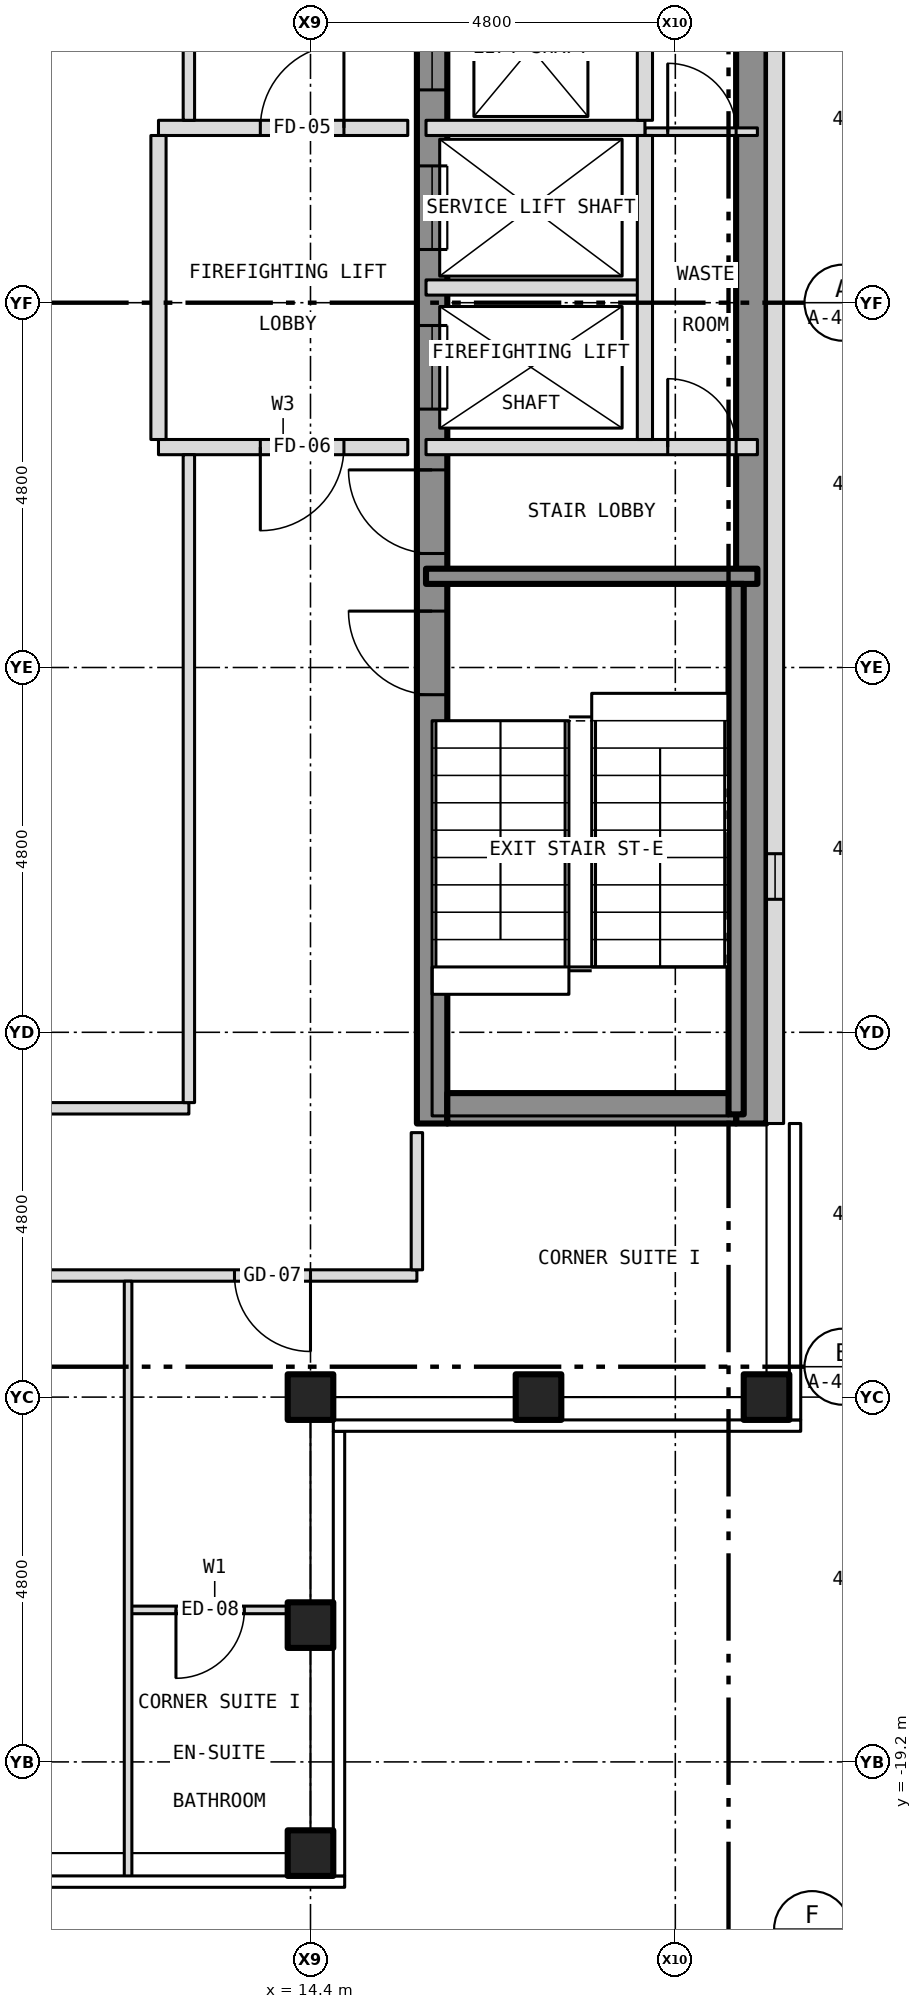
"""IFC4 building model, lengths in metres.
Left out: names, types, materials, properties, quantities, classifications, styles, units other than length and angle.
Written with IfcOpenShell. Run it as: python <this file> out.ifc"""

import sys

from ifc_helpers import new_model, si_unit, direction, frame, frame_2d, origin, origin_2d, place, context, subcontext, project, spatial, rectangle, hollow_rectangle, extrude, element, fill, save


model = new_model("IFC4")
c1 = context("Model", 3, precision=1e-05, world=origin(), true_north=direction((0.0, 1.0)))
c2 = subcontext(c1, "Body", "Model", "MODEL_VIEW")
j1 = project(units=[si_unit("LENGTHUNIT", "METRE"), si_unit("PLANEANGLEUNIT", "RADIAN")], contexts=[c1])
p1 = place(None, origin())
s1 = spatial("IfcSite", under=j1, at=p1, CompositionType="ELEMENT")
p2 = place(p1, origin())
s2 = spatial("IfcBuilding", under=s1, at=p2, CompositionType="ELEMENT")
p3 = place(p2, frame((0.0, 0.0, 255.0)))
s3 = spatial("IfcBuildingStorey", under=s2, at=p3, CompositionType="ELEMENT", Elevation=255.0)
for number, where, z_axis, x_axis in (
    (1, (14.4, -20.4, -0.15), (0.0, 0.0, 1.0), (1.0, 0.0, 0.0)),
    (2, (20.4, -14.4, -0.15), (0.0, 0.0, 1.0), (1.0, 0.0, 0.0)),
    (3, (14.4, -14.4, -0.15), (0.0, 0.0, 1.0), (1.0, 0.0, 0.0)),
    (4, (14.4, -17.4, -0.15), (0.0, 0.0, 1.0), (1.0, 0.0, 0.0)),
    (5, (17.4, -14.4, -0.15), (0.0, 0.0, 1.0), (1.0, 0.0, 0.0)),
):
    element("IfcColumn", number, at=place(p3, frame(where, z_axis=z_axis, x_axis=x_axis)), inside=s3, PredefinedType="COLUMN", context=c2, shape_type="SweptSolid", body=[
        extrude(hollow_rectangle(XDim=0.6, YDim=0.6, WallThickness=0.03, at=origin_2d()), origin(), (0.0, 0.0, 1.0), 3.5),
    ])
p4 = place(p3, frame((16.0, -10.8, 0.0), z_axis=(0.0, 0.0, 1.0), x_axis=(0.0, 1.0, 0.0)))
e6 = element("IfcWall", 6, at=p4, inside=s3, PredefinedType="SHEAR", context=c2, shape_type="SweptSolid", body=[
    extrude(rectangle(XDim=21.6, YDim=0.4, at=frame_2d((10.8, 0.0))), origin(), (0.0, 0.0, 1.0), 3.25),
])
p5 = place(p4, frame((9.4, 0.0, 0.0)))
e7 = element("IfcOpeningElement", 7, at=p5, cuts=e6, PredefinedType="OPENING", context=c2, shape_type="SweptSolid", body=[
    extrude(rectangle(XDim=1.1, YDim=2.1, at=frame_2d((0.55, 1.05))), frame((0.0, 0.212, 0.0), z_axis=(0.0, -1.0, 0.0), x_axis=(1.0, 0.0, 0.0)), (0.0, 0.0, 1.0), 0.424),
])
p6 = place(p4, frame((11.5, 0.0, 0.0)))
e8 = element("IfcOpeningElement", 8, at=p6, cuts=e6, PredefinedType="OPENING", context=c2, shape_type="SweptSolid", body=[
    extrude(rectangle(XDim=1.1, YDim=2.1, at=frame_2d((0.55, 1.05))), frame((0.0, 0.212, 0.0), z_axis=(0.0, -1.0, 0.0), x_axis=(1.0, 0.0, 0.0)), (0.0, 0.0, 1.0), 0.424),
])
p7 = place(p4, frame((13.6, 0.0, 0.0)))
e9 = element("IfcOpeningElement", 9, at=p7, cuts=e6, PredefinedType="OPENING", context=c2, shape_type="SweptSolid", body=[
    extrude(rectangle(XDim=1.1, YDim=2.1, at=frame_2d((0.55, 1.05))), frame((0.0, 0.212, 0.0), z_axis=(0.0, -1.0, 0.0), x_axis=(1.0, 0.0, 0.0)), (0.0, 0.0, 1.0), 0.424),
])
p8 = place(p4, frame((15.7, 0.0, 0.0)))
e10 = element("IfcOpeningElement", 10, at=p8, cuts=e6, PredefinedType="OPENING", context=c2, shape_type="SweptSolid", body=[
    extrude(rectangle(XDim=1.1, YDim=2.1, at=frame_2d((0.55, 1.05))), frame((0.0, 0.212, 0.0), z_axis=(0.0, -1.0, 0.0), x_axis=(1.0, 0.0, 0.0)), (0.0, 0.0, 1.0), 0.424),
])
p9 = place(p4, frame((17.8, 0.0, 0.0)))
e11 = element("IfcOpeningElement", 11, at=p9, cuts=e6, PredefinedType="OPENING", context=c2, shape_type="SweptSolid", body=[
    extrude(rectangle(XDim=1.1, YDim=2.1, at=frame_2d((0.55, 1.05))), frame((0.0, 0.212, 0.0), z_axis=(0.0, -1.0, 0.0), x_axis=(1.0, 0.0, 0.0)), (0.0, 0.0, 1.0), 0.424),
])
p10 = place(p4, frame((5.642, 0.0, 0.0)))
e12 = element("IfcOpeningElement", 12, at=p10, cuts=e6, PredefinedType="OPENING", context=c2, shape_type="SweptSolid", body=[
    extrude(rectangle(XDim=1.1, YDim=2.1, at=frame_2d((0.55, 1.05))), frame((0.0, 0.212, 0.0), z_axis=(0.0, -1.0, 0.0), x_axis=(1.0, 0.0, 0.0)), (0.0, 0.0, 1.0), 0.424),
])
p11 = place(p4, frame((7.5, 0.0, 0.0)))
e13 = element("IfcOpeningElement", 13, at=p11, cuts=e6, PredefinedType="OPENING", context=c2, shape_type="SweptSolid", body=[
    extrude(rectangle(XDim=1.1, YDim=2.1, at=frame_2d((0.55, 1.05))), frame((0.0, 0.212, 0.0), z_axis=(0.0, -1.0, 0.0), x_axis=(1.0, 0.0, 0.0)), (0.0, 0.0, 1.0), 0.424),
])
p12 = place(p4, frame((20.0, 0.0, 0.0)))
e14 = element("IfcOpeningElement", 14, at=p12, cuts=e6, PredefinedType="OPENING", context=c2, shape_type="SweptSolid", body=[
    extrude(rectangle(XDim=0.9, YDim=2.1, at=frame_2d((0.45, 1.05))), frame((0.0, 0.212, 0.0), z_axis=(0.0, -1.0, 0.0), x_axis=(1.0, 0.0, 0.0)), (0.0, 0.0, 1.0), 0.424),
])
p13 = place(p3, frame((20.2, -10.8, 0.0), z_axis=(0.0, 0.0, 1.0), x_axis=(0.0, 1.0, 0.0)))
e15 = element("IfcWall", 15, at=p13, inside=s3, PredefinedType="SHEAR", context=c2, shape_type="SweptSolid", body=[
    extrude(rectangle(XDim=21.6, YDim=0.4, at=frame_2d((10.8, 0.0))), origin(), (0.0, 0.0, 1.0), 3.25),
])
p14 = place(p3, frame((16.2, -10.6, 0.0), z_axis=(0.0, 0.0, 1.0), x_axis=(1.0, 0.0, 0.0)))
e16 = element("IfcWall", 16, at=p14, inside=s3, PredefinedType="SHEAR", context=c2, shape_type="SweptSolid", body=[
    extrude(rectangle(XDim=3.8, YDim=0.4, at=frame_2d((1.9, 0.0))), origin(), (0.0, 0.0, 1.0), 3.25),
])
p15 = place(p3, frame((20.512, -10.8, 0.0), z_axis=(0.0, 0.0, 1.0), x_axis=(0.0, 1.0, 0.0)))
e17 = element("IfcWall", 17, at=p15, inside=s3, PredefinedType="SOLIDWALL", context=c2, shape_type="SweptSolid", body=[
    extrude(rectangle(XDim=21.6, YDim=0.225, at=frame_2d((10.8, 0.0))), origin(), (0.0, 0.0, 1.0), 3.5),
])
p16 = place(p15, frame((2.95, 0.0, 1.0)))
e18 = element("IfcOpeningElement", 18, at=p16, cuts=e17, PredefinedType="OPENING", context=c2, shape_type="SweptSolid", body=[
    extrude(rectangle(XDim=0.6, YDim=1.5, at=frame_2d((0.3, 0.75))), frame((0.0, 0.125, 0.0), z_axis=(0.0, -1.0, 0.0), x_axis=(1.0, 0.0, 0.0)), (0.0, 0.0, 1.0), 0.249),
])
p17 = place(p3, frame((12.0, -17.2, 0.0), z_axis=(0.0, 0.0, 1.0), x_axis=(1.0, 0.0, 0.0)))
e19 = element("IfcWall", 19, at=p17, inside=s3, PredefinedType="PARTITIONING", context=c2, shape_type="SweptSolid", body=[
    extrude(rectangle(XDim=2.28, YDim=0.1, at=frame_2d((1.14, 0.0))), origin(), (0.0, 0.0, 1.0), 3.35),
])
p18 = place(p17, frame((0.63, 0.0, 0.0)))
e20 = element("IfcOpeningElement", 20, at=p18, cuts=e19, PredefinedType="OPENING", context=c2, shape_type="SweptSolid", body=[
    extrude(rectangle(XDim=0.9, YDim=2.1, at=frame_2d((0.45, 1.05))), frame((0.0, 0.062, 0.0), z_axis=(0.0, -1.0, 0.0), x_axis=(1.0, 0.0, 0.0)), (0.0, 0.0, 1.0), 0.124),
])
p19 = place(p3, frame((-15.8, -12.8, 0.0), z_axis=(0.0, 0.0, 1.0), x_axis=(1.0, 0.0, 0.0)))
e21 = element("IfcWall", 21, at=p19, inside=s3, PredefinedType="PARTITIONING", context=c2, shape_type="SweptSolid", body=[
    extrude(rectangle(XDim=31.6, YDim=0.15, at=frame_2d((15.8, 0.0))), origin(), (0.0, 0.0, 1.0), 3.35),
])
p20 = place(p19, frame((10.55, 0.0, 0.0)))
e22 = element("IfcOpeningElement", 22, at=p20, cuts=e21, PredefinedType="OPENING", context=c2, shape_type="SweptSolid", body=[
    extrude(rectangle(XDim=0.9, YDim=2.1, at=frame_2d((0.45, 1.05))), frame((0.0, 0.087, 0.0), z_axis=(0.0, -1.0, 0.0), x_axis=(1.0, 0.0, 0.0)), (0.0, 0.0, 1.0), 0.174),
])
p21 = place(p19, frame((19.0, 0.0, 0.0)))
e23 = element("IfcOpeningElement", 23, at=p21, cuts=e21, PredefinedType="OPENING", context=c2, shape_type="SweptSolid", body=[
    extrude(rectangle(XDim=1.0, YDim=2.1, at=frame_2d((0.5, 1.05))), frame((0.0, 0.087, 0.0), z_axis=(0.0, -1.0, 0.0), x_axis=(1.0, 0.0, 0.0)), (0.0, 0.0, 1.0), 0.174),
])
p22 = place(p19, frame((24.95, 0.0, 0.0)))
e24 = element("IfcOpeningElement", 24, at=p22, cuts=e21, PredefinedType="OPENING", context=c2, shape_type="SweptSolid", body=[
    extrude(rectangle(XDim=0.9, YDim=2.1, at=frame_2d((0.45, 1.05))), frame((0.0, 0.087, 0.0), z_axis=(0.0, -1.0, 0.0), x_axis=(1.0, 0.0, 0.0)), (0.0, 0.0, 1.0), 0.174),
])
p23 = place(p19, frame((1.4, 0.0, 0.0)))
e25 = element("IfcOpeningElement", 25, at=p23, cuts=e21, PredefinedType="OPENING", context=c2, shape_type="SweptSolid", body=[
    extrude(rectangle(XDim=1.0, YDim=2.1, at=frame_2d((0.5, 1.05))), frame((0.0, 0.087, 0.0), z_axis=(0.0, -1.0, 0.0), x_axis=(1.0, 0.0, 0.0)), (0.0, 0.0, 1.0), 0.174),
])
p24 = place(p19, frame((29.2, 0.0, 0.0)))
e26 = element("IfcOpeningElement", 26, at=p24, cuts=e21, PredefinedType="OPENING", context=c2, shape_type="SweptSolid", body=[
    extrude(rectangle(XDim=1.0, YDim=2.1, at=frame_2d((0.5, 1.05))), frame((0.0, 0.087, 0.0), z_axis=(0.0, -1.0, 0.0), x_axis=(1.0, 0.0, 0.0)), (0.0, 0.0, 1.0), 0.174),
])
p25 = place(p3, frame((4.8, -10.6, 0.0), z_axis=(0.0, 0.0, 1.0), x_axis=(1.0, 0.0, 0.0)))
e27 = element("IfcWall", 27, at=p25, inside=s3, PredefinedType="PARTITIONING", context=c2, shape_type="SweptSolid", body=[
    extrude(rectangle(XDim=8.0, YDim=0.15, at=frame_2d((4.0, 0.0))), origin(), (0.0, 0.0, 1.0), 3.35),
])
p26 = place(p3, frame((15.92, -3.6, 0.0), z_axis=(0.0, 0.0, 1.0), x_axis=(1.0, 0.0, 0.0)))
e28 = element("IfcWall", 28, at=p26, inside=s3, PredefinedType="SHEAR", context=c2, shape_type="SweptSolid", body=[
    extrude(rectangle(XDim=4.36, YDim=0.2, at=frame_2d((2.18, 0.0))), origin(), (0.0, 0.0, 1.0), 3.25),
])
p27 = place(p3, frame((12.4, -1.9, 0.0), z_axis=(0.0, 0.0, 1.0), x_axis=(1.0, 0.0, 0.0)))
e29 = element("IfcWall", 29, at=p27, inside=s3, PredefinedType="PARTITIONING", context=c2, shape_type="SweptSolid", body=[
    extrude(rectangle(XDim=3.28, YDim=0.2, at=frame_2d((1.64, 0.0))), origin(), (0.0, 0.0, 1.0), 3.35),
])
p28 = place(p27, frame((1.34, 0.0, 0.0)))
e30 = element("IfcOpeningElement", 30, at=p28, cuts=e29, PredefinedType="OPENING", context=c2, shape_type="SweptSolid", body=[
    extrude(rectangle(XDim=1.1, YDim=2.1, at=frame_2d((0.55, 1.05))), frame((0.0, 0.112, 0.0), z_axis=(0.0, -1.0, 0.0), x_axis=(1.0, 0.0, 0.0)), (0.0, 0.0, 1.0), 0.224),
])
p29 = place(p3, frame((15.92, -1.9, 0.0), z_axis=(0.0, 0.0, 1.0), x_axis=(1.0, 0.0, 0.0)))
e31 = element("IfcWall", 31, at=p29, inside=s3, PredefinedType="PARTITIONING", context=c2, shape_type="SweptSolid", body=[
    extrude(rectangle(XDim=4.36, YDim=0.2, at=frame_2d((2.18, 0.0))), origin(), (0.0, 0.0, 1.0), 3.25),
])
p30 = place(p29, frame((3.18, 0.0, 0.0)))
e32 = element("IfcOpeningElement", 32, at=p30, cuts=e31, PredefinedType="OPENING", context=c2, shape_type="SweptSolid", body=[
    extrude(rectangle(XDim=0.9, YDim=2.1, at=frame_2d((0.45, 1.05))), frame((0.0, 0.112, 0.0), z_axis=(0.0, -1.0, 0.0), x_axis=(1.0, 0.0, 0.0)), (0.0, 0.0, 1.0), 0.224),
])
p31 = place(p3, frame((15.92, 0.2, 0.0), z_axis=(0.0, 0.0, 1.0), x_axis=(1.0, 0.0, 0.0)))
e33 = element("IfcWall", 33, at=p31, inside=s3, PredefinedType="PARTITIONING", context=c2, shape_type="SweptSolid", body=[
    extrude(rectangle(XDim=2.88, YDim=0.2, at=frame_2d((1.44, 0.0))), origin(), (0.0, 0.0, 1.0), 3.25),
])
p32 = place(p3, frame((18.8, 2.25, 0.0), z_axis=(0.0, 0.0, 1.0), x_axis=(1.0, 0.0, 0.0)))
e34 = element("IfcWall", 34, at=p32, inside=s3, PredefinedType="PARTITIONING", context=c2, shape_type="SweptSolid", body=[
    extrude(rectangle(XDim=1.48, YDim=0.1, at=frame_2d((0.74, 0.0))), origin(), (0.0, 0.0, 1.0), 3.25),
])
p33 = place(p32, frame((0.3, 0.0, 0.0)))
e35 = element("IfcOpeningElement", 35, at=p33, cuts=e34, PredefinedType="OPENING", context=c2, shape_type="SweptSolid", body=[
    extrude(rectangle(XDim=0.9, YDim=2.1, at=frame_2d((0.45, 1.05))), frame((0.0, 0.062, 0.0), z_axis=(0.0, -1.0, 0.0), x_axis=(1.0, 0.0, 0.0)), (0.0, 0.0, 1.0), 0.124),
])
p34 = place(p3, frame((12.4, 2.3, 0.0), z_axis=(0.0, 0.0, 1.0), x_axis=(1.0, 0.0, 0.0)))
e36 = element("IfcWall", 36, at=p34, inside=s3, PredefinedType="PARTITIONING", context=c2, shape_type="SweptSolid", body=[
    extrude(rectangle(XDim=3.28, YDim=0.2, at=frame_2d((1.64, 0.0))), origin(), (0.0, 0.0, 1.0), 3.35),
])
p35 = place(p34, frame((1.34, 0.0, 0.0)))
e37 = element("IfcOpeningElement", 37, at=p35, cuts=e36, PredefinedType="OPENING", context=c2, shape_type="SweptSolid", body=[
    extrude(rectangle(XDim=1.1, YDim=2.1, at=frame_2d((0.55, 1.05))), frame((0.0, 0.112, 0.0), z_axis=(0.0, -1.0, 0.0), x_axis=(1.0, 0.0, 0.0)), (0.0, 0.0, 1.0), 0.224),
])
p36 = place(p3, frame((15.92, 2.3, 0.0), z_axis=(0.0, 0.0, 1.0), x_axis=(1.0, 0.0, 0.0)))
e38 = element("IfcWall", 38, at=p36, inside=s3, PredefinedType="PARTITIONING", context=c2, shape_type="SweptSolid", body=[
    extrude(rectangle(XDim=2.88, YDim=0.2, at=frame_2d((1.44, 0.0))), origin(), (0.0, 0.0, 1.0), 3.25),
])
p37 = place(p3, frame((12.0, -20.73, 0.0), z_axis=(0.0, 0.0, 1.0), x_axis=(0.0, 1.0, 0.0)))
e39 = element("IfcWall", 39, at=p37, inside=s3, PredefinedType="PARTITIONING", context=c2, shape_type="SweptSolid", body=[
    extrude(rectangle(XDim=7.855, YDim=0.1, at=frame_2d((3.927, 0.0))), origin(), (0.0, 0.0, 1.0), 3.35),
])
p38 = place(p3, frame((12.4, -1.8, 0.0), z_axis=(0.0, 0.0, 1.0), x_axis=(0.0, 1.0, 0.0)))
e40 = element("IfcWall", 40, at=p38, inside=s3, PredefinedType="PARTITIONING", context=c2, shape_type="SweptSolid", body=[
    extrude(rectangle(XDim=4.0, YDim=0.2, at=frame_2d((2.0, 0.0))), origin(), (0.0, 0.0, 1.0), 3.35),
])
p39 = place(p3, frame((12.8, -10.525, 0.0), z_axis=(0.0, 0.0, 1.0), x_axis=(0.0, 1.0, 0.0)))
e41 = element("IfcWall", 41, at=p39, inside=s3, PredefinedType="PARTITIONING", context=c2, shape_type="SweptSolid", body=[
    extrude(rectangle(XDim=8.525, YDim=0.15, at=frame_2d((4.262, 0.0))), origin(), (0.0, 0.0, 1.0), 3.35),
])
p40 = place(p3, frame((12.8, 2.4, 0.0), z_axis=(0.0, 0.0, 1.0), x_axis=(0.0, 1.0, 0.0)))
e42 = element("IfcWall", 42, at=p40, inside=s3, PredefinedType="PARTITIONING", context=c2, shape_type="SweptSolid", body=[
    extrude(rectangle(XDim=3.425, YDim=0.15, at=frame_2d((1.712, 0.0))), origin(), (0.0, 0.0, 1.0), 3.35),
])
p41 = place(p3, frame((15.8, -12.725, 0.0), z_axis=(0.0, 0.0, 1.0), x_axis=(0.0, 1.0, 0.0)))
e43 = element("IfcWall", 43, at=p41, inside=s3, PredefinedType="PARTITIONING", context=c2, shape_type="SweptSolid", body=[
    extrude(rectangle(XDim=1.805, YDim=0.15, at=frame_2d((0.903, 0.0))), origin(), (0.0, 0.0, 1.0), 3.35),
])
for number, where, z_axis, x_axis in (
    (44, (18.8, -1.8, 0.0), (0.0, 0.0, 1.0), (0.0, 1.0, 0.0)),
    (45, (18.8, 2.4, 0.0), (0.0, 0.0, 1.0), (0.0, 1.0, 0.0)),
):
    element("IfcWall", number, at=place(p3, frame(where, z_axis=z_axis, x_axis=x_axis)), inside=s3, PredefinedType="PARTITIONING", context=c2, shape_type="SweptSolid", body=[
        extrude(rectangle(XDim=4.0, YDim=0.2, at=frame_2d((2.0, 0.0))), origin(), (0.0, 0.0, 1.0), 3.25),
    ])
p42 = place(p3, frame((20.0, -10.68, 0.0), z_axis=(0.0, 0.0, 1.0), x_axis=(0.0, 1.0, 0.0)))
e46 = element("IfcWall", 46, at=p42, inside=s3, PredefinedType="SHEAR", context=c2, shape_type="SweptSolid", body=[
    extrude(rectangle(XDim=6.98, YDim=0.2, at=frame_2d((3.49, 0.0))), origin(), (0.0, 0.0, 1.0), 3.25),
])
p43 = place(p16, origin())
e47 = element("IfcWindow", 47, at=p43, inside=s3, PartitioningType="SINGLE_PANEL", PredefinedType="WINDOW", context=c2, shape_type="SweptSolid", body=[
    extrude(rectangle(XDim=0.6, YDim=1.5, at=frame_2d((0.3, 0.75))), frame((0.0, -0.022, 0.0), z_axis=(0.0, -1.0, 0.0), x_axis=(1.0, 0.0, 0.0)), (0.0, 0.0, 1.0), 0.06),
])
fill(e18, e47)
p44 = place(p5, origin())
e48 = element("IfcDoor", 48, at=p44, inside=s3, OperationType="SLIDING_TO_LEFT", PredefinedType="DOOR", context=c2, shape_type="SweptSolid", body=[
    extrude(rectangle(XDim=1.1, YDim=2.1, at=frame_2d((0.55, 1.05))), frame((0.0, 0.025, 0.0), z_axis=(0.0, -1.0, 0.0), x_axis=(1.0, 0.0, 0.0)), (0.0, 0.0, 1.0), 0.05),
])
fill(e7, e48)
p45 = place(p6, origin())
e49 = element("IfcDoor", 49, at=p45, inside=s3, OperationType="SLIDING_TO_LEFT", PredefinedType="DOOR", context=c2, shape_type="SweptSolid", body=[
    extrude(rectangle(XDim=1.1, YDim=2.1, at=frame_2d((0.55, 1.05))), frame((0.0, 0.025, 0.0), z_axis=(0.0, -1.0, 0.0), x_axis=(1.0, 0.0, 0.0)), (0.0, 0.0, 1.0), 0.05),
])
fill(e8, e49)
p46 = place(p7, origin())
e50 = element("IfcDoor", 50, at=p46, inside=s3, OperationType="SLIDING_TO_LEFT", PredefinedType="DOOR", context=c2, shape_type="SweptSolid", body=[
    extrude(rectangle(XDim=1.1, YDim=2.1, at=frame_2d((0.55, 1.05))), frame((0.0, 0.025, 0.0), z_axis=(0.0, -1.0, 0.0), x_axis=(1.0, 0.0, 0.0)), (0.0, 0.0, 1.0), 0.05),
])
fill(e9, e50)
p47 = place(p10, origin())
e51 = element("IfcDoor", 51, at=p47, inside=s3, OperationType="SINGLE_SWING_RIGHT", PredefinedType="DOOR", context=c2, shape_type="SweptSolid", body=[
    extrude(rectangle(XDim=1.1, YDim=2.1, at=frame_2d((0.55, 1.05))), frame((0.0, 0.025, 0.0), z_axis=(0.0, -1.0, 0.0), x_axis=(1.0, 0.0, 0.0)), (0.0, 0.0, 1.0), 0.05),
])
fill(e12, e51)
p48 = place(p11, origin())
e52 = element("IfcDoor", 52, at=p48, inside=s3, OperationType="SINGLE_SWING_RIGHT", PredefinedType="DOOR", context=c2, shape_type="SweptSolid", body=[
    extrude(rectangle(XDim=1.1, YDim=2.1, at=frame_2d((0.55, 1.05))), frame((0.0, 0.025, 0.0), z_axis=(0.0, -1.0, 0.0), x_axis=(1.0, 0.0, 0.0)), (0.0, 0.0, 1.0), 0.05),
])
fill(e13, e52)
p49 = place(p30, origin())
e53 = element("IfcDoor", 53, at=p49, inside=s3, OperationType="SINGLE_SWING_LEFT", PredefinedType="DOOR", context=c2, shape_type="SweptSolid", body=[
    extrude(rectangle(XDim=0.9, YDim=2.1, at=frame_2d((0.45, 1.05))), frame((0.0, 0.025, 0.0), z_axis=(0.0, -1.0, 0.0), x_axis=(1.0, 0.0, 0.0)), (0.0, 0.0, 1.0), 0.05),
])
fill(e32, e53)
p50 = place(p33, origin())
e54 = element("IfcDoor", 54, at=p50, inside=s3, OperationType="SINGLE_SWING_LEFT", PredefinedType="DOOR", context=c2, shape_type="SweptSolid", body=[
    extrude(rectangle(XDim=0.9, YDim=2.1, at=frame_2d((0.45, 1.05))), frame((0.0, 0.025, 0.0), z_axis=(0.0, -1.0, 0.0), x_axis=(1.0, 0.0, 0.0)), (0.0, 0.0, 1.0), 0.05),
])
fill(e35, e54)
p51 = place(p35, origin())
e55 = element("IfcDoor", 55, at=p51, inside=s3, OperationType="SINGLE_SWING_RIGHT", PredefinedType="DOOR", context=c2, shape_type="SweptSolid", body=[
    extrude(rectangle(XDim=1.1, YDim=2.1, at=frame_2d((0.55, 1.05))), frame((0.0, 0.025, 0.0), z_axis=(0.0, -1.0, 0.0), x_axis=(1.0, 0.0, 0.0)), (0.0, 0.0, 1.0), 0.05),
])
fill(e37, e55)
p52 = place(p28, origin())
e56 = element("IfcDoor", 56, at=p52, inside=s3, OperationType="SINGLE_SWING_LEFT", PredefinedType="DOOR", context=c2, shape_type="SweptSolid", body=[
    extrude(rectangle(XDim=1.1, YDim=2.1, at=frame_2d((0.55, 1.05))), frame((0.0, 0.025, 0.0), z_axis=(0.0, -1.0, 0.0), x_axis=(1.0, 0.0, 0.0)), (0.0, 0.0, 1.0), 0.05),
])
fill(e30, e56)
p53 = place(p18, origin())
e57 = element("IfcDoor", 57, at=p53, inside=s3, OperationType="SINGLE_SWING_LEFT", PredefinedType="DOOR", context=c2, shape_type="SweptSolid", body=[
    extrude(rectangle(XDim=0.9, YDim=2.1, at=frame_2d((0.45, 1.05))), frame((0.0, 0.025, 0.0), z_axis=(0.0, -1.0, 0.0), x_axis=(1.0, 0.0, 0.0)), (0.0, 0.0, 1.0), 0.05),
])
fill(e20, e57)
p54 = place(p24, origin())
e58 = element("IfcDoor", 58, at=p54, inside=s3, OperationType="SINGLE_SWING_RIGHT", PredefinedType="DOOR", context=c2, shape_type="SweptSolid", body=[
    extrude(rectangle(XDim=1.0, YDim=2.1, at=frame_2d((0.5, 1.05))), frame((0.0, 0.025, 0.0), z_axis=(0.0, -1.0, 0.0), x_axis=(1.0, 0.0, 0.0)), (0.0, 0.0, 1.0), 0.05),
])
fill(e26, e58)
save(model, sys.argv[1])
